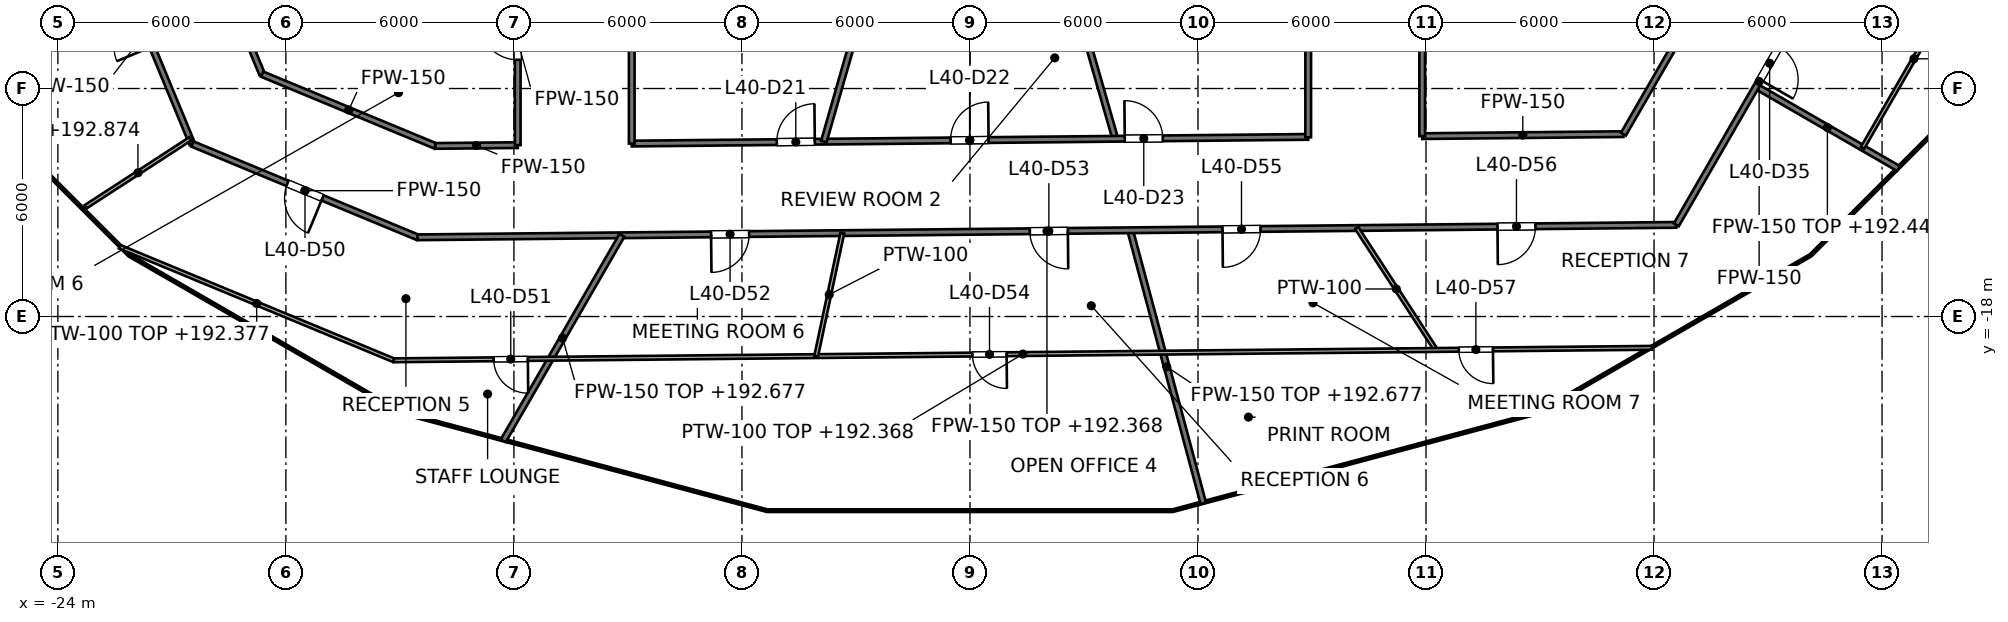
"""IFC4 building model, lengths in metres.
Left out: names, types, materials, properties, quantities, classifications, styles, units other than length and angle.
Written with IfcOpenShell. Run it as: python <this file> out.ifc"""

import sys

from ifc_helpers import new_model, si_unit, direction, frame, frame_2d, origin, place, context, subcontext, project, spatial, rectangle, extrude, element, fill, save


model = new_model("IFC4")
c1 = context("Model", 3, precision=1e-05, world=origin(), true_north=direction((0.0, 1.0)))
c2 = subcontext(c1, "Body", "Model", "MODEL_VIEW")
j1 = project(units=[si_unit("LENGTHUNIT", "METRE"), si_unit("PLANEANGLEUNIT", "RADIAN")], contexts=[c1])
p1 = place(None, origin())
s1 = spatial("IfcSite", under=j1, at=p1, CompositionType="ELEMENT")
p2 = place(p1, origin())
s2 = spatial("IfcBuilding", under=s1, at=p2, CompositionType="ELEMENT")
p3 = place(p2, frame((0.0, 0.0, 189.6)))
s3 = spatial("IfcBuildingStorey", under=s2, at=p3, CompositionType="ELEMENT", Elevation=189.6)
p4 = place(p3, frame((4.215, -15.73, 0.0), z_axis=(0.0, 0.0, 1.0), x_axis=(0.258765615768, -0.965940141052, 0.0)))
e1 = element("IfcWall", 1, at=p4, inside=s3, PredefinedType="PARTITIONING", context=c2, shape_type="SweptSolid", body=[
    extrude(rectangle(XDim=7.438, YDim=0.15, at=frame_2d((3.719, 0.0))), origin(), (0.0, 0.0, 1.0), 3.077),
])
p5 = place(p3, frame((2.296, -8.0, 0.0), z_axis=(0.0, 0.0, 1.0), x_axis=(0.275935525478, -0.961176147113, 0.0)))
e2 = element("IfcWall", 2, at=p5, inside=s3, PredefinedType="PARTITIONING", context=c2, shape_type="SweptSolid", body=[
    extrude(rectangle(XDim=5.548, YDim=0.15, at=frame_2d((2.774, 0.0))), origin(), (0.0, 0.0, 1.0), 3.7),
])
p6 = place(p3, frame((-22.9, -7.572, 0.0), z_axis=(0.0, 0.0, 1.0), x_axis=(0.382367581622, -0.924010298928, 0.0)))
e3 = element("IfcWall", 3, at=p6, inside=s3, PredefinedType="PARTITIONING", context=c2, shape_type="SweptSolid", body=[
    extrude(rectangle(XDim=6.374, YDim=0.15, at=frame_2d((3.187, 0.0))), origin(), (0.0, 0.0, 1.0), 2.777),
])
p7 = place(p6, frame((2.6, 0.0, 0.0)))
e4 = element("IfcOpeningElement", 4, at=p7, cuts=e3, PredefinedType="OPENING", context=c2, shape_type="SweptSolid", body=[
    extrude(rectangle(XDim=1.0, YDim=2.1, at=frame_2d((0.5, 1.05))), frame((0.0, 0.075, 0.0), z_axis=(0.0, -1.0, 0.0), x_axis=(1.0, 0.0, 0.0)), (0.0, 0.0, 1.0), 0.15),
])
p8 = place(p3, frame((-20.5, -7.095, 0.0), z_axis=(0.0, 0.0, 1.0), x_axis=(0.382364990163, -0.924011371303, 0.0)))
e5 = element("IfcWall", 5, at=p8, inside=s3, PredefinedType="PARTITIONING", context=c2, shape_type="SweptSolid", body=[
    extrude(rectangle(XDim=4.902, YDim=0.15, at=frame_2d((2.451, 0.0))), origin(), (0.0, 0.0, 1.0), 2.845),
])
p9 = place(p3, frame((20.69, -11.945, 0.0), z_axis=(0.0, 0.0, 1.0), x_axis=(0.866048255864, -0.499960416948, 0.0)))
e6 = element("IfcWall", 6, at=p9, inside=s3, PredefinedType="PARTITIONING", context=c2, shape_type="SweptSolid", body=[
    extrude(rectangle(XDim=4.322, YDim=0.15, at=frame_2d((2.161, 0.0))), origin(), (0.0, 0.0, 1.0), 2.845),
])
p10 = place(p3, frame((-20.46, -13.46, 0.0), z_axis=(0.0, 0.0, 1.0), x_axis=(0.923801547606, -0.382871650349, 0.0)))
e7 = element("IfcWall", 7, at=p10, inside=s3, PredefinedType="PARTITIONING", context=c2, shape_type="SweptSolid", body=[
    extrude(rectangle(XDim=6.415, YDim=0.15, at=frame_2d((3.208, 0.0))), origin(), (0.0, 0.0, 1.0), 2.777),
])
p11 = place(p10, frame((2.707, 0.0, 0.0)))
e8 = element("IfcOpeningElement", 8, at=p11, cuts=e7, PredefinedType="OPENING", context=c2, shape_type="SweptSolid", body=[
    extrude(rectangle(XDim=1.0, YDim=2.1, at=frame_2d((0.5, 1.05))), frame((0.0, 0.075, 0.0), z_axis=(0.0, -1.0, 0.0), x_axis=(1.0, 0.0, 0.0)), (0.0, 0.0, 1.0), 0.15),
])
p12 = place(p3, frame((-18.623, -11.623, 0.0), z_axis=(0.0, 0.0, 1.0), x_axis=(0.923791670587, -0.38289548098, 0.0)))
e9 = element("IfcWall", 9, at=p12, inside=s3, PredefinedType="PARTITIONING", context=c2, shape_type="SweptSolid", body=[
    extrude(rectangle(XDim=4.931, YDim=0.15, at=frame_2d((2.465, 0.0))), origin(), (0.0, 0.0, 1.0), 2.777),
])
p13 = place(p3, frame((-14.534, -15.916, 0.0), z_axis=(0.0, 0.0, 1.0), x_axis=(0.999951221888, 0.009876935033, 0.0)))
e10 = element("IfcWall", 10, at=p13, inside=s3, PredefinedType="PARTITIONING", context=c2, shape_type="SweptSolid", body=[
    extrude(rectangle(XDim=33.123, YDim=0.15, at=frame_2d((16.561, 0.0))), origin(), (0.0, 0.0, 1.0), 2.768),
])
p14 = place(p13, frame((7.722, 0.0, 0.0)))
e11 = element("IfcOpeningElement", 11, at=p14, cuts=e10, PredefinedType="OPENING", context=c2, shape_type="SweptSolid", body=[
    extrude(rectangle(XDim=1.0, YDim=2.1, at=frame_2d((0.5, 1.05))), frame((0.0, 0.075, 0.0), z_axis=(0.0, -1.0, 0.0), x_axis=(1.0, 0.0, 0.0)), (0.0, 0.0, 1.0), 0.15),
])
p15 = place(p13, frame((16.111, 0.0, 0.0)))
e12 = element("IfcOpeningElement", 12, at=p15, cuts=e10, PredefinedType="OPENING", context=c2, shape_type="SweptSolid", body=[
    extrude(rectangle(XDim=1.0, YDim=2.1, at=frame_2d((0.5, 1.05))), frame((0.0, 0.075, 0.0), z_axis=(0.0, -1.0, 0.0), x_axis=(1.0, 0.0, 0.0)), (0.0, 0.0, 1.0), 0.15),
])
p16 = place(p13, frame((21.18, 0.0, 0.0)))
e13 = element("IfcOpeningElement", 13, at=p16, cuts=e10, PredefinedType="OPENING", context=c2, shape_type="SweptSolid", body=[
    extrude(rectangle(XDim=1.0, YDim=2.1, at=frame_2d((0.5, 1.05))), frame((0.0, 0.075, 0.0), z_axis=(0.0, -1.0, 0.0), x_axis=(1.0, 0.0, 0.0)), (0.0, 0.0, 1.0), 0.15),
])
p17 = place(p13, frame((28.416, 0.0, 0.0)))
e14 = element("IfcOpeningElement", 14, at=p17, cuts=e10, PredefinedType="OPENING", context=c2, shape_type="SweptSolid", body=[
    extrude(rectangle(XDim=1.0, YDim=2.1, at=frame_2d((0.5, 1.05))), frame((0.0, 0.075, 0.0), z_axis=(0.0, -1.0, 0.0), x_axis=(1.0, 0.0, 0.0)), (0.0, 0.0, 1.0), 0.15),
])
p18 = place(p3, frame((-14.068, -13.511, 0.0), z_axis=(0.0, 0.0, 1.0), x_axis=(0.999950911515, 0.009908307647, 0.0)))
e15 = element("IfcWall", 15, at=p18, inside=s3, PredefinedType="PARTITIONING", context=c2, shape_type="SweptSolid", body=[
    extrude(rectangle(XDim=2.168, YDim=0.15, at=frame_2d((1.084, 0.0))), origin(), (0.0, 0.0, 1.0), 2.777),
])
p19 = place(p3, frame((-8.9, -13.449, 0.0), z_axis=(0.0, 0.0, 1.0), x_axis=(0.999951241216, 0.009874977968, 0.0)))
e16 = element("IfcWall", 16, at=p19, inside=s3, PredefinedType="PARTITIONING", context=c2, shape_type="SweptSolid", body=[
    extrude(rectangle(XDim=17.801, YDim=0.15, at=frame_2d((8.9, 0.0))), origin(), (0.0, 0.0, 1.0), 2.768),
])
p20 = place(p19, frame((3.817, 0.0, 0.0)))
e17 = element("IfcOpeningElement", 17, at=p20, cuts=e16, PredefinedType="OPENING", context=c2, shape_type="SweptSolid", body=[
    extrude(rectangle(XDim=1.0, YDim=2.1, at=frame_2d((0.5, 1.05))), frame((0.0, 0.075, 0.0), z_axis=(0.0, -1.0, 0.0), x_axis=(1.0, 0.0, 0.0)), (0.0, 0.0, 1.0), 0.15),
])
p21 = place(p19, frame((8.39, 0.0, 0.0)))
e18 = element("IfcOpeningElement", 18, at=p21, cuts=e16, PredefinedType="OPENING", context=c2, shape_type="SweptSolid", body=[
    extrude(rectangle(XDim=1.0, YDim=2.1, at=frame_2d((0.5, 1.05))), frame((0.0, 0.075, 0.0), z_axis=(0.0, -1.0, 0.0), x_axis=(1.0, 0.0, 0.0)), (0.0, 0.0, 1.0), 0.15),
])
p22 = place(p19, frame((12.974, 0.0, 0.0)))
e19 = element("IfcOpeningElement", 19, at=p22, cuts=e16, PredefinedType="OPENING", context=c2, shape_type="SweptSolid", body=[
    extrude(rectangle(XDim=1.0, YDim=2.1, at=frame_2d((0.5, 1.05))), frame((0.0, 0.075, 0.0), z_axis=(0.0, -1.0, 0.0), x_axis=(1.0, 0.0, 0.0)), (0.0, 0.0, 1.0), 0.15),
])
p23 = place(p3, frame((11.9, -13.253, 0.0), z_axis=(0.0, 0.0, 1.0), x_axis=(0.999951309192, 0.009868092237, 0.0)))
e20 = element("IfcWall", 20, at=p23, inside=s3, PredefinedType="PARTITIONING", context=c2, shape_type="SweptSolid", body=[
    extrude(rectangle(XDim=5.294, YDim=0.15, at=frame_2d((2.647, 0.0))), origin(), (0.0, 0.0, 1.0), 2.777),
])
p24 = place(p3, frame((18.587, -15.587, 0.0), z_axis=(0.0, 0.0, 1.0), x_axis=(0.499960140076, 0.866048415699, 0.0)))
e21 = element("IfcWall", 21, at=p24, inside=s3, PredefinedType="PARTITIONING", context=c2, shape_type="SweptSolid", body=[
    extrude(rectangle(XDim=8.714, YDim=0.15, at=frame_2d((4.357, 0.0))), origin(), (0.0, 0.0, 1.0), 2.777),
])
p25 = place(p24, frame((4.41, 0.0, 0.0)))
e22 = element("IfcOpeningElement", 22, at=p25, cuts=e21, PredefinedType="OPENING", context=c2, shape_type="SweptSolid", body=[
    extrude(rectangle(XDim=1.0, YDim=2.1, at=frame_2d((0.5, 1.05))), frame((0.0, 0.075, 0.0), z_axis=(0.0, -1.0, 0.0), x_axis=(1.0, 0.0, 0.0)), (0.0, 0.0, 1.0), 0.15),
])
p26 = place(p3, frame((17.194, -13.201, 0.0), z_axis=(0.0, 0.0, 1.0), x_axis=(0.499955744085, 0.866050953441, 0.0)))
e23 = element("IfcWall", 23, at=p26, inside=s3, PredefinedType="PARTITIONING", context=c2, shape_type="SweptSolid", body=[
    extrude(rectangle(XDim=6.673, YDim=0.15, at=frame_2d((3.337, 0.0))), origin(), (0.0, 0.0, 1.0), 2.777),
])
p27 = place(p26, frame((2.835, 0.0, 0.0)))
e24 = element("IfcOpeningElement", 24, at=p27, cuts=e23, PredefinedType="OPENING", context=c2, shape_type="SweptSolid", body=[
    extrude(rectangle(XDim=1.0, YDim=2.1, at=frame_2d((0.5, 1.05))), frame((0.0, 0.075, 0.0), z_axis=(0.0, -1.0, 0.0), x_axis=(1.0, 0.0, 0.0)), (0.0, 0.0, 1.0), 0.15),
])
p28 = place(p3, frame((-12.28, -21.27, 0.0), z_axis=(0.0, 0.0, 1.0), x_axis=(0.499966163276, 0.866044938545, 0.0)))
e25 = element("IfcWall", 25, at=p28, inside=s3, PredefinedType="PARTITIONING", context=c2, shape_type="SweptSolid", body=[
    extrude(rectangle(XDim=6.244, YDim=0.15, at=frame_2d((3.122, 0.0))), origin(), (0.0, 0.0, 1.0), 3.077),
])
p29 = place(p3, frame((-3.846, -13.399, 0.0), z_axis=(0.0, 0.0, 1.0), x_axis=(0.275914969745, 0.961182048038, 0.0)))
e26 = element("IfcWall", 26, at=p29, inside=s3, PredefinedType="PARTITIONING", context=c2, shape_type="SweptSolid", body=[
    extrude(rectangle(XDim=5.617, YDim=0.15, at=frame_2d((2.809, 0.0))), origin(), (0.0, 0.0, 1.0), 3.7),
])
p30 = place(p3, frame((11.9, -13.253, 0.0), z_axis=(0.0, 0.0, 1.0), x_axis=(0.0, 1.0, 0.0)))
e27 = element("IfcWall", 27, at=p30, inside=s3, PredefinedType="PARTITIONING", context=c2, shape_type="SweptSolid", body=[
    extrude(rectangle(XDim=5.253, YDim=0.15, at=frame_2d((2.626, 0.0))), origin(), (0.0, 0.0, 1.0), 2.777),
])
p31 = place(p3, frame((8.9, -13.283, 0.0), z_axis=(0.0, 0.0, 1.0), x_axis=(0.0, 1.0, 0.0)))
e28 = element("IfcWall", 28, at=p31, inside=s3, PredefinedType="PARTITIONING", context=c2, shape_type="SweptSolid", body=[
    extrude(rectangle(XDim=5.283, YDim=0.15, at=frame_2d((2.642, 0.0))), origin(), (0.0, 0.0, 1.0), 2.777),
])
p32 = place(p3, frame((-8.9, -13.449, 0.0), z_axis=(0.0, 0.0, 1.0), x_axis=(0.0, 1.0, 0.0)))
e29 = element("IfcWall", 29, at=p32, inside=s3, PredefinedType="PARTITIONING", context=c2, shape_type="SweptSolid", body=[
    extrude(rectangle(XDim=5.449, YDim=0.15, at=frame_2d((2.725, 0.0))), origin(), (0.0, 0.0, 1.0), 2.777),
])
p33 = place(p3, frame((-11.9, -13.49, 0.0), z_axis=(0.0, 0.0, 1.0), x_axis=(0.0, 1.0, 0.0)))
e30 = element("IfcWall", 30, at=p33, inside=s3, PredefinedType="PARTITIONING", context=c2, shape_type="SweptSolid", body=[
    extrude(rectangle(XDim=5.49, YDim=0.15, at=frame_2d((2.745, 0.0))), origin(), (0.0, 0.0, 1.0), 2.777),
])
p34 = place(p33, frame((2.245, 0.0, 0.0)))
e31 = element("IfcOpeningElement", 31, at=p34, cuts=e30, PredefinedType="OPENING", context=c2, shape_type="SweptSolid", body=[
    extrude(rectangle(XDim=1.0, YDim=2.1, at=frame_2d((0.5, 1.05))), frame((0.0, 0.075, 0.0), z_axis=(0.0, -1.0, 0.0), x_axis=(1.0, 0.0, 0.0)), (0.0, 0.0, 1.0), 0.15),
])
p35 = place(p3, frame((10.177, -15.671, 0.0), z_axis=(0.0, 0.0, 1.0), x_axis=(0.544647409198, -0.838665129628, 0.0)))
e32 = element("IfcWall", 32, at=p35, inside=s3, PredefinedType="PARTITIONING", context=c2, shape_type="SweptSolid", body=[
    extrude(rectangle(XDim=3.826, YDim=0.1, at=frame_2d((1.913, 0.0))), origin(), (0.0, 0.0, 1.0), 3.7),
])
p36 = place(p3, frame((-22.377, -16.162, 0.0), z_axis=(0.0, 0.0, 1.0), x_axis=(0.92383433172, -0.382792538505, 0.0)))
e33 = element("IfcWall", 33, at=p36, inside=s3, PredefinedType="PARTITIONING", context=c2, shape_type="SweptSolid", body=[
    extrude(rectangle(XDim=7.811, YDim=0.1, at=frame_2d((3.906, 0.0))), origin(), (0.0, 0.0, 1.0), 2.777),
])
p37 = place(p3, frame((-15.161, -19.152, 0.0), z_axis=(0.0, 0.0, 1.0), x_axis=(0.999950812999, 0.009918244889, 0.0)))
e34 = element("IfcWall", 34, at=p37, inside=s3, PredefinedType="PARTITIONING", context=c2, shape_type="SweptSolid", body=[
    extrude(rectangle(XDim=33.108, YDim=0.1, at=frame_2d((16.554, 0.0))), origin(), (0.0, 0.0, 1.0), 2.768),
])
p38 = place(p37, frame((2.628, 0.0, 0.0)))
e35 = element("IfcOpeningElement", 35, at=p38, cuts=e34, PredefinedType="OPENING", context=c2, shape_type="SweptSolid", body=[
    extrude(rectangle(XDim=0.9, YDim=2.1, at=frame_2d((0.45, 1.05))), frame((0.0, 0.05, 0.0), z_axis=(0.0, -1.0, 0.0), x_axis=(1.0, 0.0, 0.0)), (0.0, 0.0, 1.0), 0.1),
])
p39 = place(p37, frame((15.226, 0.0, 0.0)))
e36 = element("IfcOpeningElement", 36, at=p39, cuts=e34, PredefinedType="OPENING", context=c2, shape_type="SweptSolid", body=[
    extrude(rectangle(XDim=0.9, YDim=2.1, at=frame_2d((0.45, 1.05))), frame((0.0, 0.05, 0.0), z_axis=(0.0, -1.0, 0.0), x_axis=(1.0, 0.0, 0.0)), (0.0, 0.0, 1.0), 0.1),
])
p40 = place(p37, frame((28.024, 0.0, 0.0)))
e37 = element("IfcOpeningElement", 37, at=p40, cuts=e34, PredefinedType="OPENING", context=c2, shape_type="SweptSolid", body=[
    extrude(rectangle(XDim=0.9, YDim=2.1, at=frame_2d((0.45, 1.05))), frame((0.0, 0.05, 0.0), z_axis=(0.0, -1.0, 0.0), x_axis=(1.0, 0.0, 0.0)), (0.0, 0.0, 1.0), 0.1),
])
p41 = place(p3, frame((-23.271, -15.113, 0.0), z_axis=(0.0, 0.0, 1.0), x_axis=(0.83866769183, 0.544643463819, 0.0)))
e38 = element("IfcWall", 38, at=p41, inside=s3, PredefinedType="PARTITIONING", context=c2, shape_type="SweptSolid", body=[
    extrude(rectangle(XDim=3.285, YDim=0.1, at=frame_2d((1.643, 0.0))), origin(), (0.0, 0.0, 1.0), 3.273),
])
p42 = place(p3, frame((23.487, -13.56, 0.0), z_axis=(0.0, 0.0, 1.0), x_axis=(0.500066272392, 0.86598713802, 0.0)))
e39 = element("IfcWall", 39, at=p42, inside=s3, PredefinedType="PARTITIONING", context=c2, shape_type="SweptSolid", body=[
    extrude(rectangle(XDim=5.409, YDim=0.1, at=frame_2d((2.705, 0.0))), origin(), (0.0, 0.0, 1.0), 2.845),
])
p43 = place(p3, frame((-4.047, -19.042, 0.0), z_axis=(0.0, 0.0, 1.0), x_axis=(0.207961984092, 0.978136909217, 0.0)))
e40 = element("IfcWall", 40, at=p43, inside=s3, PredefinedType="PARTITIONING", context=c2, shape_type="SweptSolid", body=[
    extrude(rectangle(XDim=3.309, YDim=0.1, at=frame_2d((1.655, 0.0))), origin(), (0.0, 0.0, 1.0), 3.7),
])
p44 = place(p20, origin())
e41 = element("IfcDoor", 41, at=p44, inside=s3, OperationType="SINGLE_SWING_RIGHT", PredefinedType="DOOR", context=c2, shape_type="SweptSolid", body=[
    extrude(rectangle(XDim=1.0, YDim=2.1, at=frame_2d((0.5, 1.05))), frame((0.0, 0.025, 0.0), z_axis=(0.0, -1.0, 0.0), x_axis=(1.0, 0.0, 0.0)), (0.0, 0.0, 1.0), 0.05),
])
fill(e17, e41)
p45 = place(p21, origin())
e42 = element("IfcDoor", 42, at=p45, inside=s3, OperationType="SINGLE_SWING_RIGHT", PredefinedType="DOOR", context=c2, shape_type="SweptSolid", body=[
    extrude(rectangle(XDim=1.0, YDim=2.1, at=frame_2d((0.5, 1.05))), frame((0.0, 0.025, 0.0), z_axis=(0.0, -1.0, 0.0), x_axis=(1.0, 0.0, 0.0)), (0.0, 0.0, 1.0), 0.05),
])
fill(e18, e42)
p46 = place(p22, origin())
e43 = element("IfcDoor", 43, at=p46, inside=s3, OperationType="SINGLE_SWING_LEFT", PredefinedType="DOOR", context=c2, shape_type="SweptSolid", body=[
    extrude(rectangle(XDim=1.0, YDim=2.1, at=frame_2d((0.5, 1.05))), frame((0.0, 0.025, 0.0), z_axis=(0.0, -1.0, 0.0), x_axis=(1.0, 0.0, 0.0)), (0.0, 0.0, 1.0), 0.05),
])
fill(e19, e43)
p47 = place(p34, origin())
e44 = element("IfcDoor", 44, at=p47, inside=s3, OperationType="SINGLE_SWING_RIGHT", PredefinedType="DOOR", context=c2, shape_type="SweptSolid", body=[
    extrude(rectangle(XDim=1.0, YDim=2.1, at=frame_2d((0.5, 1.05))), frame((0.0, 0.025, 0.0), z_axis=(0.0, -1.0, 0.0), x_axis=(1.0, 0.0, 0.0)), (0.0, 0.0, 1.0), 0.05),
])
fill(e31, e44)
p48 = place(p25, origin())
e45 = element("IfcDoor", 45, at=p48, inside=s3, OperationType="SINGLE_SWING_LEFT", PredefinedType="DOOR", context=c2, shape_type="SweptSolid", body=[
    extrude(rectangle(XDim=1.0, YDim=2.1, at=frame_2d((0.5, 1.05))), frame((0.0, 0.025, 0.0), z_axis=(0.0, -1.0, 0.0), x_axis=(1.0, 0.0, 0.0)), (0.0, 0.0, 1.0), 0.05),
])
fill(e22, e45)
p49 = place(p11, origin())
e46 = element("IfcDoor", 46, at=p49, inside=s3, OperationType="SINGLE_SWING_RIGHT", PredefinedType="DOOR", context=c2, shape_type="SweptSolid", body=[
    extrude(rectangle(XDim=1.0, YDim=2.1, at=frame_2d((0.5, 1.05))), frame((0.0, 0.025, 0.0), z_axis=(0.0, -1.0, 0.0), x_axis=(1.0, 0.0, 0.0)), (0.0, 0.0, 1.0), 0.05),
])
fill(e8, e46)
p50 = place(p38, origin())
e47 = element("IfcDoor", 47, at=p50, inside=s3, OperationType="SINGLE_SWING_RIGHT", PredefinedType="DOOR", context=c2, shape_type="SweptSolid", body=[
    extrude(rectangle(XDim=0.9, YDim=2.1, at=frame_2d((0.45, 1.05))), frame((0.0, 0.025, 0.0), z_axis=(0.0, -1.0, 0.0), x_axis=(1.0, 0.0, 0.0)), (0.0, 0.0, 1.0), 0.05),
])
fill(e35, e47)
p51 = place(p14, origin())
e48 = element("IfcDoor", 48, at=p51, inside=s3, OperationType="SINGLE_SWING_LEFT", PredefinedType="DOOR", context=c2, shape_type="SweptSolid", body=[
    extrude(rectangle(XDim=1.0, YDim=2.1, at=frame_2d((0.5, 1.05))), frame((0.0, 0.025, 0.0), z_axis=(0.0, -1.0, 0.0), x_axis=(1.0, 0.0, 0.0)), (0.0, 0.0, 1.0), 0.05),
])
fill(e11, e48)
p52 = place(p15, origin())
e49 = element("IfcDoor", 49, at=p52, inside=s3, OperationType="SINGLE_SWING_RIGHT", PredefinedType="DOOR", context=c2, shape_type="SweptSolid", body=[
    extrude(rectangle(XDim=1.0, YDim=2.1, at=frame_2d((0.5, 1.05))), frame((0.0, 0.025, 0.0), z_axis=(0.0, -1.0, 0.0), x_axis=(1.0, 0.0, 0.0)), (0.0, 0.0, 1.0), 0.05),
])
fill(e12, e49)
p53 = place(p39, origin())
e50 = element("IfcDoor", 50, at=p53, inside=s3, OperationType="SINGLE_SWING_RIGHT", PredefinedType="DOOR", context=c2, shape_type="SweptSolid", body=[
    extrude(rectangle(XDim=0.9, YDim=2.1, at=frame_2d((0.45, 1.05))), frame((0.0, 0.025, 0.0), z_axis=(0.0, -1.0, 0.0), x_axis=(1.0, 0.0, 0.0)), (0.0, 0.0, 1.0), 0.05),
])
fill(e36, e50)
p54 = place(p16, origin())
e51 = element("IfcDoor", 51, at=p54, inside=s3, OperationType="SINGLE_SWING_LEFT", PredefinedType="DOOR", context=c2, shape_type="SweptSolid", body=[
    extrude(rectangle(XDim=1.0, YDim=2.1, at=frame_2d((0.5, 1.05))), frame((0.0, 0.025, 0.0), z_axis=(0.0, -1.0, 0.0), x_axis=(1.0, 0.0, 0.0)), (0.0, 0.0, 1.0), 0.05),
])
fill(e13, e51)
p55 = place(p17, origin())
e52 = element("IfcDoor", 52, at=p55, inside=s3, OperationType="SINGLE_SWING_LEFT", PredefinedType="DOOR", context=c2, shape_type="SweptSolid", body=[
    extrude(rectangle(XDim=1.0, YDim=2.1, at=frame_2d((0.5, 1.05))), frame((0.0, 0.025, 0.0), z_axis=(0.0, -1.0, 0.0), x_axis=(1.0, 0.0, 0.0)), (0.0, 0.0, 1.0), 0.05),
])
fill(e14, e52)
p56 = place(p40, origin())
e53 = element("IfcDoor", 53, at=p56, inside=s3, OperationType="SINGLE_SWING_RIGHT", PredefinedType="DOOR", context=c2, shape_type="SweptSolid", body=[
    extrude(rectangle(XDim=0.9, YDim=2.1, at=frame_2d((0.45, 1.05))), frame((0.0, 0.025, 0.0), z_axis=(0.0, -1.0, 0.0), x_axis=(1.0, 0.0, 0.0)), (0.0, 0.0, 1.0), 0.05),
])
fill(e37, e53)
save(model, sys.argv[1])
